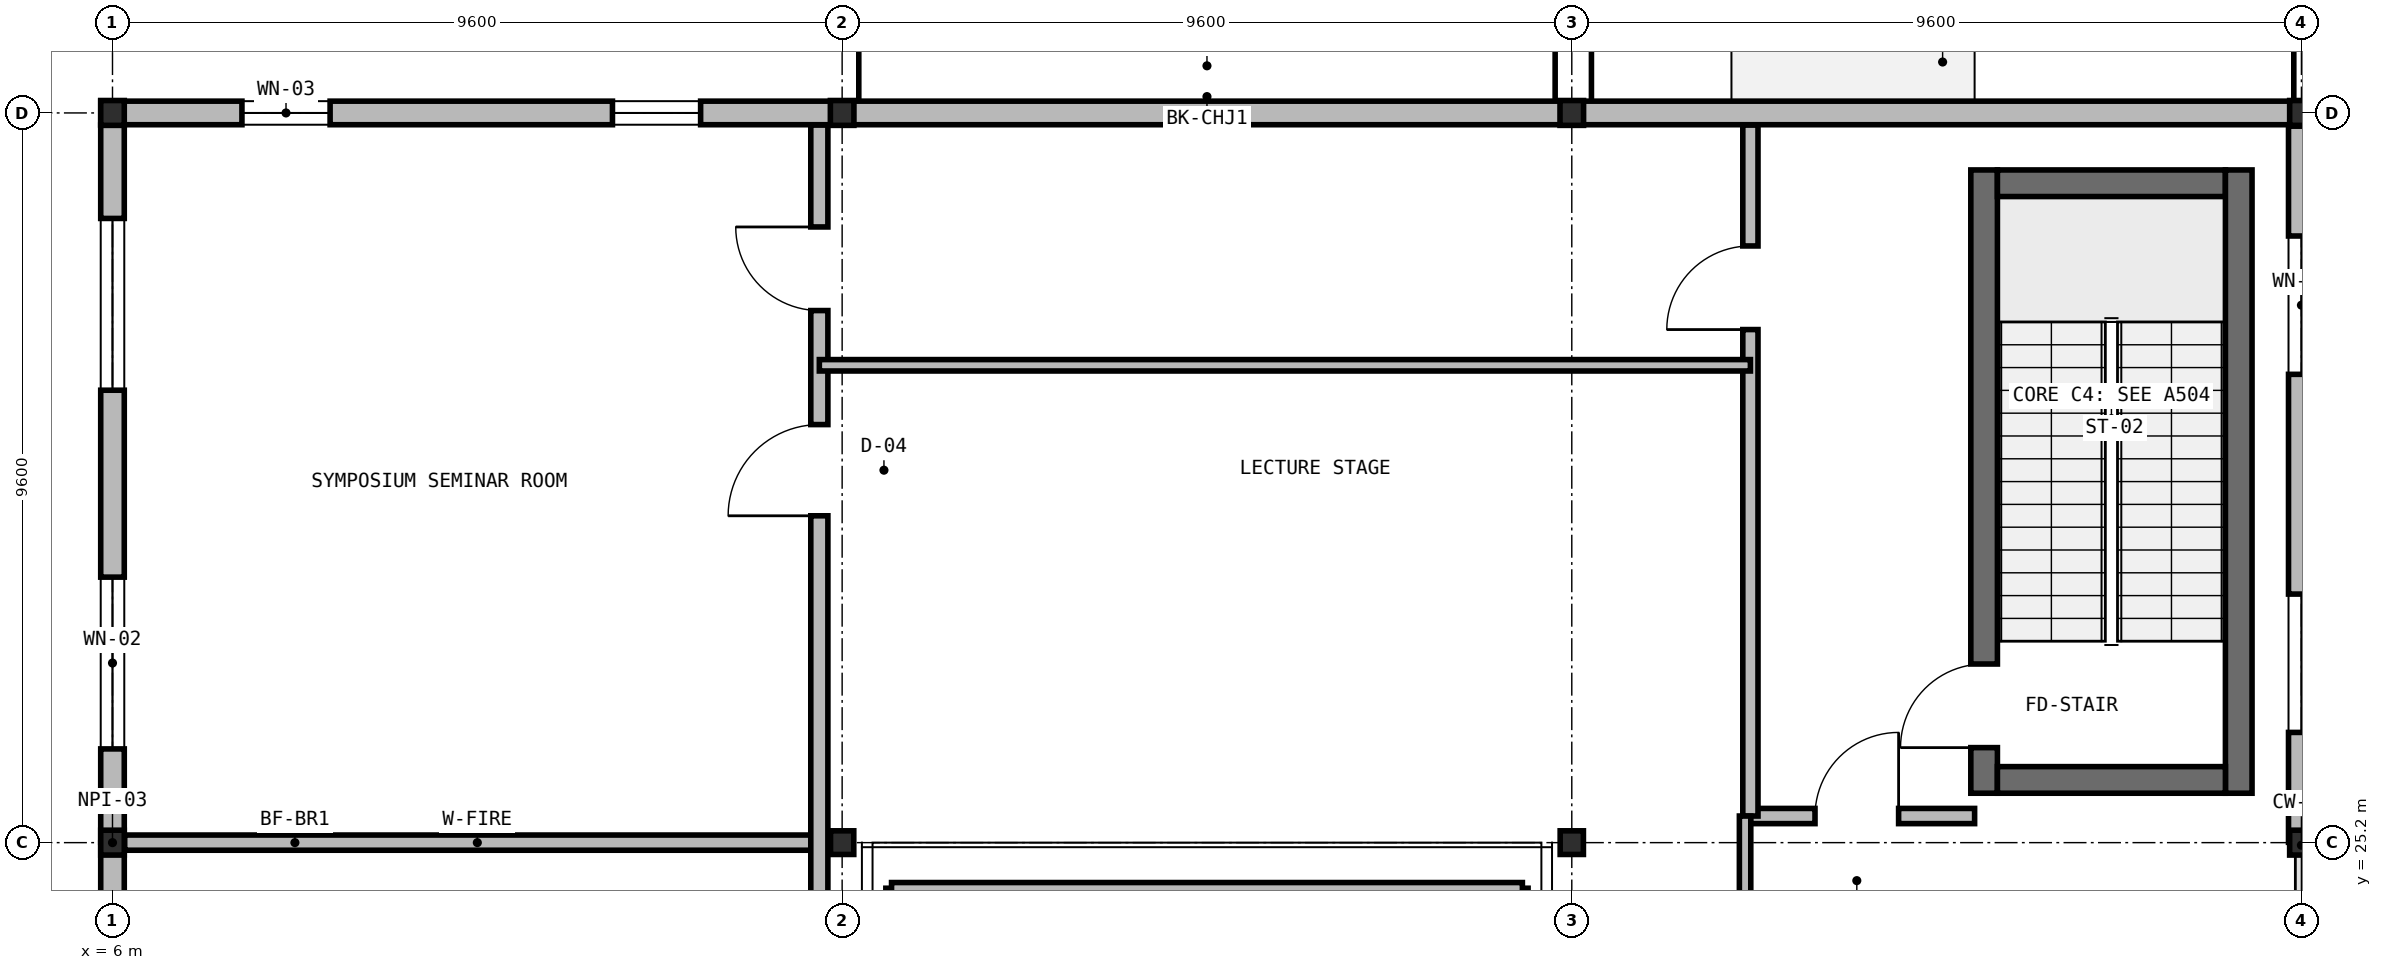
"""IFC4 building model, lengths in metres.
Left out: names, types, materials, properties, quantities, classifications, styles, units other than length and angle.
Written with IfcOpenShell. Run it as: python <this file> out.ifc"""

import sys

from ifc_helpers import new_model, si_unit, direction, frame, frame_2d, origin, origin_2d, place, context, subcontext, project, spatial, rectangle, i_section, extrude, element, fill, save


model = new_model("IFC4")
c1 = context("Model", 3, precision=1e-05, world=origin(), true_north=direction((0.0, 1.0)))
c2 = subcontext(c1, "Body", "Model", "MODEL_VIEW")
j1 = project(units=[si_unit("LENGTHUNIT", "METRE"), si_unit("PLANEANGLEUNIT", "RADIAN")], contexts=[c1])
p1 = place(None, origin())
s1 = spatial("IfcSite", under=j1, at=p1, CompositionType="ELEMENT")
p2 = place(p1, origin())
s2 = spatial("IfcBuilding", under=s1, at=p2, CompositionType="ELEMENT")
p3 = place(p2, origin())
s3 = spatial("IfcBuildingStorey", under=s2, at=p3, CompositionType="ELEMENT", Elevation=0.0)
p4 = place(p3, frame((30.625, 25.85, 0.0), z_axis=(0.0, 0.0, 1.0), x_axis=(0.0, 1.0, 0.0)))
e1 = element("IfcWall", 1, at=p4, inside=s3, PredefinedType="SHEAR", context=c2, shape_type="SweptSolid", body=[
    extrude(rectangle(XDim=8.2, YDim=0.35, at=frame_2d((4.1, 0.0))), origin(), (0.0, 0.0, 1.0), 5.25),
])
p5 = place(p4, frame((0.6, 0.0, 0.0)))
e2 = element("IfcOpeningElement", 2, at=p5, cuts=e1, PredefinedType="OPENING", context=c2, shape_type="SweptSolid", body=[
    extrude(rectangle(XDim=1.1, YDim=2.15, at=frame_2d((0.55, 1.075))), frame((0.0, 0.185, 0.0), z_axis=(0.0, -1.0, 0.0), x_axis=(1.0, 0.0, 0.0)), (0.0, 0.0, 1.0), 0.37),
])
p6 = place(p3, frame((30.8, 33.875, 0.0), z_axis=(0.0, 0.0, 1.0), x_axis=(1.0, 0.0, 0.0)))
e3 = element("IfcWall", 3, at=p6, inside=s3, PredefinedType="SHEAR", context=c2, shape_type="SweptSolid", body=[
    extrude(rectangle(XDim=3.0, YDim=0.35, at=frame_2d((1.5, 0.0))), origin(), (0.0, 0.0, 1.0), 5.25),
])
p7 = place(p3, frame((33.975, 34.05, 0.0), z_axis=(0.0, 0.0, 1.0), x_axis=(0.0, -1.0, 0.0)))
e4 = element("IfcWall", 4, at=p7, inside=s3, PredefinedType="SHEAR", context=c2, shape_type="SweptSolid", body=[
    extrude(rectangle(XDim=8.2, YDim=0.35, at=frame_2d((4.1, 0.0))), origin(), (0.0, 0.0, 1.0), 5.25),
])
p8 = place(p3, frame((33.8, 26.025, 0.0), z_axis=(0.0, 0.0, 1.0), x_axis=(-1.0, 0.0, 0.0)))
e5 = element("IfcWall", 5, at=p8, inside=s3, PredefinedType="SHEAR", context=c2, shape_type="SweptSolid", body=[
    extrude(rectangle(XDim=3.0, YDim=0.35, at=frame_2d((1.5, 0.0))), origin(), (0.0, 0.0, 1.0), 5.25),
])
for number, where, z_axis, x_axis in (
    (6, (6.0, 25.2, 0.0), (0.0, 0.0, 1.0), (1.0, 0.0, 0.0)),
    (7, (6.0, 34.8, 0.0), (0.0, 0.0, 1.0), (1.0, 0.0, 0.0)),
):
    element("IfcColumn", number, at=place(p3, frame(where, z_axis=z_axis, x_axis=x_axis)), inside=s3, PredefinedType="COLUMN", context=c2, shape_type="SweptSolid", body=[
        extrude(i_section(OverallWidth=0.31, OverallDepth=0.327, WebThickness=0.016, FlangeThickness=0.025, at=origin_2d()), origin(), (0.0, 0.0, 1.0), 5.25),
    ])
p9 = place(p3, frame((15.6, 25.2, 0.0), z_axis=(0.0, 0.0, 1.0), x_axis=(1.0, 0.0, 0.0)))
e8 = element("IfcColumn", 8, at=p9, inside=s3, PredefinedType="COLUMN", context=c2, shape_type="SweptSolid", body=[
    extrude(i_section(OverallWidth=0.306, OverallDepth=0.311, WebThickness=0.011, FlangeThickness=0.017, at=origin_2d()), origin(), (0.0, 0.0, 1.0), 5.25),
])
p10 = place(p3, frame((15.6, 34.8, 0.0), z_axis=(0.0, 0.0, 1.0), x_axis=(1.0, 0.0, 0.0)))
e9 = element("IfcColumn", 9, at=p10, inside=s3, PredefinedType="COLUMN", context=c2, shape_type="SweptSolid", body=[
    extrude(i_section(OverallWidth=0.31, OverallDepth=0.327, WebThickness=0.016, FlangeThickness=0.025, at=origin_2d()), origin(), (0.0, 0.0, 1.0), 5.25),
])
p11 = place(p3, frame((25.2, 25.2, 0.0), z_axis=(0.0, 0.0, 1.0), x_axis=(1.0, 0.0, 0.0)))
e10 = element("IfcColumn", 10, at=p11, inside=s3, PredefinedType="COLUMN", context=c2, shape_type="SweptSolid", body=[
    extrude(i_section(OverallWidth=0.306, OverallDepth=0.311, WebThickness=0.011, FlangeThickness=0.017, at=origin_2d()), origin(), (0.0, 0.0, 1.0), 5.25),
])
for number, where, z_axis, x_axis in (
    (11, (25.2, 34.8, 0.0), (0.0, 0.0, 1.0), (1.0, 0.0, 0.0)),
    (12, (34.8, 25.2, 0.0), (0.0, 0.0, 1.0), (1.0, 0.0, 0.0)),
    (13, (34.8, 34.8, 0.0), (0.0, 0.0, 1.0), (1.0, 0.0, 0.0)),
):
    element("IfcColumn", number, at=place(p3, frame(where, z_axis=z_axis, x_axis=x_axis)), inside=s3, PredefinedType="COLUMN", context=c2, shape_type="SweptSolid", body=[
        extrude(i_section(OverallWidth=0.31, OverallDepth=0.327, WebThickness=0.016, FlangeThickness=0.025, at=origin_2d()), origin(), (0.0, 0.0, 1.0), 5.25),
    ])
p12 = place(p3, frame((6.0, 15.604, 0.0), z_axis=(0.0, 0.0, 1.0), x_axis=(0.0, 1.0, 0.0)))
e14 = element("IfcWall", 14, at=p12, inside=s3, PredefinedType="SOLIDWALL", context=c2, shape_type="SweptSolid", body=[
    extrude(rectangle(XDim=9.592, YDim=0.31, at=frame_2d((4.796, 0.0))), origin(), (0.0, 0.0, 1.0), 4.584),
])
p13 = place(p12, frame((0.85, 0.0, 0.0)))
e15 = element("IfcOpeningElement", 15, at=p13, cuts=e14, PredefinedType="OPENING", context=c2, shape_type="SweptSolid", body=[
    extrude(rectangle(XDim=1.5, YDim=2.2, at=frame_2d((0.75, 1.1))), frame((0.0, 0.165, 0.0), z_axis=(0.0, -1.0, 0.0), x_axis=(1.0, 0.0, 0.0)), (0.0, 0.0, 1.0), 0.33),
])
p14 = place(p3, frame((6.0, 25.204, 0.0), z_axis=(0.0, 0.0, 1.0), x_axis=(0.0, 1.0, 0.0)))
e16 = element("IfcWall", 16, at=p14, inside=s3, PredefinedType="SOLIDWALL", context=c2, shape_type="SweptSolid", body=[
    extrude(rectangle(XDim=9.437, YDim=0.31, at=frame_2d((4.719, 0.0))), origin(), (0.0, 0.0, 1.0), 4.584),
])
p15 = place(p14, frame((1.229, 0.0, 0.95)))
e17 = element("IfcOpeningElement", 17, at=p15, cuts=e16, PredefinedType="OPENING", context=c2, shape_type="SweptSolid", body=[
    extrude(rectangle(XDim=2.26, YDim=1.86, at=frame_2d((1.13, 0.93))), frame((0.0, 0.165, 0.0), z_axis=(0.0, -1.0, 0.0), x_axis=(1.0, 0.0, 0.0)), (0.0, 0.0, 1.0), 0.33),
])
p16 = place(p14, frame((5.948, 0.0, 0.95)))
e18 = element("IfcOpeningElement", 18, at=p16, cuts=e16, PredefinedType="OPENING", context=c2, shape_type="SweptSolid", body=[
    extrude(rectangle(XDim=2.26, YDim=1.86, at=frame_2d((1.13, 0.93))), frame((0.0, 0.165, 0.0), z_axis=(0.0, -1.0, 0.0), x_axis=(1.0, 0.0, 0.0)), (0.0, 0.0, 1.0), 0.33),
])
p17 = place(p3, frame((5.845, 34.8, 0.0), z_axis=(0.0, 0.0, 1.0), x_axis=(1.0, 0.0, 0.0)))
e19 = element("IfcWall", 19, at=p17, inside=s3, PredefinedType="SOLIDWALL", context=c2, shape_type="SweptSolid", body=[
    extrude(rectangle(XDim=9.751, YDim=0.31, at=frame_2d((4.875, 0.0))), origin(), (0.0, 0.0, 1.0), 4.584),
])
p18 = place(p17, frame((1.858, 0.0, 0.95)))
e20 = element("IfcOpeningElement", 20, at=p18, cuts=e19, PredefinedType="OPENING", context=c2, shape_type="SweptSolid", body=[
    extrude(rectangle(XDim=1.16, YDim=1.7, at=frame_2d((0.58, 0.85))), frame((0.0, 0.165, 0.0), z_axis=(0.0, -1.0, 0.0), x_axis=(1.0, 0.0, 0.0)), (0.0, 0.0, 1.0), 0.33),
])
p19 = place(p17, frame((6.733, 0.0, 0.95)))
e21 = element("IfcOpeningElement", 21, at=p19, cuts=e19, PredefinedType="OPENING", context=c2, shape_type="SweptSolid", body=[
    extrude(rectangle(XDim=1.16, YDim=1.7, at=frame_2d((0.58, 0.85))), frame((0.0, 0.165, 0.0), z_axis=(0.0, -1.0, 0.0), x_axis=(1.0, 0.0, 0.0)), (0.0, 0.0, 1.0), 0.33),
])
p20 = place(p3, frame((15.604, 34.8, 0.0), z_axis=(0.0, 0.0, 1.0), x_axis=(1.0, 0.0, 0.0)))
e22 = element("IfcWall", 22, at=p20, inside=s3, PredefinedType="SOLIDWALL", context=c2, shape_type="SweptSolid", body=[
    extrude(rectangle(XDim=9.592, YDim=0.31, at=frame_2d((4.796, 0.0))), origin(), (0.0, 0.0, 1.0), 4.584),
])
p21 = place(p3, frame((25.204, 34.8, 0.0), z_axis=(0.0, 0.0, 1.0), x_axis=(1.0, 0.0, 0.0)))
e23 = element("IfcWall", 23, at=p21, inside=s3, PredefinedType="SOLIDWALL", context=c2, shape_type="SweptSolid", body=[
    extrude(rectangle(XDim=9.751, YDim=0.31, at=frame_2d((4.875, 0.0))), origin(), (0.0, 0.0, 1.0), 4.584),
])
p22 = place(p3, frame((34.8, 34.626, 0.0), z_axis=(0.0, 0.0, 1.0), x_axis=(0.0, -1.0, 0.0)))
e24 = element("IfcWall", 24, at=p22, inside=s3, PredefinedType="SOLIDWALL", context=c2, shape_type="SweptSolid", body=[
    extrude(rectangle(XDim=9.422, YDim=0.34, at=frame_2d((4.711, 0.0))), origin(), (0.0, 0.0, 1.0), 4.584),
])
p23 = place(p22, frame((1.445, 0.0, 0.95)))
e25 = element("IfcOpeningElement", 25, at=p23, cuts=e24, PredefinedType="OPENING", context=c2, shape_type="SweptSolid", body=[
    extrude(rectangle(XDim=1.82, YDim=2.02, at=frame_2d((0.91, 1.01))), frame((0.0, 0.18, 0.0), z_axis=(0.0, -1.0, 0.0), x_axis=(1.0, 0.0, 0.0)), (0.0, 0.0, 1.0), 0.36),
])
p24 = place(p22, frame((6.156, 0.0, 0.95)))
e26 = element("IfcOpeningElement", 26, at=p24, cuts=e24, PredefinedType="OPENING", context=c2, shape_type="SweptSolid", body=[
    extrude(rectangle(XDim=1.82, YDim=2.02, at=frame_2d((0.91, 1.01))), frame((0.0, 0.18, 0.0), z_axis=(0.0, -1.0, 0.0), x_axis=(1.0, 0.0, 0.0)), (0.0, 0.0, 1.0), 0.36),
])
p25 = place(p3, frame((6.16, 25.2, 0.0), z_axis=(0.0, 0.0, 1.0), x_axis=(1.0, 0.0, 0.0)))
e27 = element("IfcWall", 27, at=p25, inside=s3, PredefinedType="SOLIDWALL", context=c2, shape_type="SweptSolid", body=[
    extrude(rectangle(XDim=9.28, YDim=0.2, at=frame_2d((4.64, 0.0))), origin(), (0.0, 0.0, 1.0), 4.517),
])
p26 = place(p3, frame((27.55, 25.55, 0.0), z_axis=(0.0, 0.0, 1.0), x_axis=(1.0, 0.0, 0.0)))
e28 = element("IfcWall", 28, at=p26, inside=s3, PredefinedType="SOLIDWALL", context=c2, shape_type="SweptSolid", body=[
    extrude(rectangle(XDim=2.95, YDim=0.2, at=frame_2d((1.475, 0.0))), origin(), (0.0, 0.0, 1.0), 4.93),
])
p27 = place(p26, frame((0.85, 0.0, 0.0)))
e29 = element("IfcOpeningElement", 29, at=p27, cuts=e28, PredefinedType="OPENING", context=c2, shape_type="SweptSolid", body=[
    extrude(rectangle(XDim=1.1, YDim=2.15, at=frame_2d((0.55, 1.075))), frame((0.0, 0.11, 0.0), z_axis=(0.0, -1.0, 0.0), x_axis=(1.0, 0.0, 0.0)), (0.0, 0.0, 1.0), 0.22),
])
p28 = place(p3, frame((27.55, 25.55, 0.0), z_axis=(0.0, 0.0, 1.0), x_axis=(0.0, 1.0, 0.0)))
e30 = element("IfcWall", 30, at=p28, inside=s3, PredefinedType="SOLIDWALL", context=c2, shape_type="SweptSolid", body=[
    extrude(rectangle(XDim=9.09, YDim=0.2, at=frame_2d((4.545, 0.0))), origin(), (0.0, 0.0, 1.0), 4.93),
])
p29 = place(p28, frame((6.4, 0.0, 0.0)))
e31 = element("IfcOpeningElement", 31, at=p29, cuts=e30, PredefinedType="OPENING", context=c2, shape_type="SweptSolid", body=[
    extrude(rectangle(XDim=1.1, YDim=2.15, at=frame_2d((0.55, 1.075))), frame((0.0, 0.11, 0.0), z_axis=(0.0, -1.0, 0.0), x_axis=(1.0, 0.0, 0.0)), (0.0, 0.0, 1.0), 0.22),
])
for number, where, z_axis, x_axis in (
    (32, (16.25, 17.0, 0.0), (0.0, 0.0, 1.0), (0.0, 1.0, 0.0)),
    (33, (24.55, 17.0, 0.0), (0.0, 0.0, 1.0), (0.0, 1.0, 0.0)),
):
    element("IfcWall", number, at=place(p3, frame(where, z_axis=z_axis, x_axis=x_axis)), inside=s3, PredefinedType="PARTITIONING", context=c2, shape_type="SweptSolid", body=[
        extrude(rectangle(XDim=7.6, YDim=0.15, at=frame_2d((3.8, 0.0))), origin(), (0.0, 0.0, 1.0), 4.93),
    ])
p30 = place(p3, frame((16.25, 24.6, 0.0), z_axis=(0.0, 0.0, 1.0), x_axis=(1.0, 0.0, 0.0)))
e34 = element("IfcWall", 34, at=p30, inside=s3, PredefinedType="PARTITIONING", context=c2, shape_type="SweptSolid", body=[
    extrude(rectangle(XDim=8.3, YDim=0.15, at=frame_2d((4.15, 0.0))), origin(), (0.0, 0.0, 1.0), 4.93),
])
p31 = place(p3, frame((27.48, 13.9, 0.0), z_axis=(0.0, 0.0, 1.0), x_axis=(0.0, 1.0, 0.0)))
e35 = element("IfcWall", 35, at=p31, inside=s3, PredefinedType="PARTITIONING", context=c2, shape_type="SweptSolid", body=[
    extrude(rectangle(XDim=11.65, YDim=0.15, at=frame_2d((5.825, 0.0))), origin(), (0.0, 0.0, 1.0), 4.93),
])
p32 = place(p3, frame((15.3, 13.9, 0.0), z_axis=(0.0, 0.0, 1.0), x_axis=(0.0, 1.0, 0.0)))
e36 = element("IfcWall", 36, at=p32, inside=s3, PredefinedType="SOLIDWALL", context=c2, shape_type="SweptSolid", body=[
    extrude(rectangle(XDim=20.74, YDim=0.225, at=frame_2d((10.37, 0.0))), origin(), (0.0, 0.0, 1.0), 4.93),
])
p33 = place(p32, frame((3.3, 0.0, 0.0)))
e37 = element("IfcOpeningElement", 37, at=p33, cuts=e36, PredefinedType="OPENING", context=c2, shape_type="SweptSolid", body=[
    extrude(rectangle(XDim=1.2, YDim=2.2, at=frame_2d((0.6, 1.1))), frame((0.0, 0.123, 0.0), z_axis=(0.0, -1.0, 0.0), x_axis=(1.0, 0.0, 0.0)), (0.0, 0.0, 1.0), 0.245),
])
p34 = place(p32, frame((15.6, 0.0, 0.0)))
e38 = element("IfcOpeningElement", 38, at=p34, cuts=e36, PredefinedType="OPENING", context=c2, shape_type="SweptSolid", body=[
    extrude(rectangle(XDim=1.2, YDim=2.2, at=frame_2d((0.6, 1.1))), frame((0.0, 0.123, 0.0), z_axis=(0.0, -1.0, 0.0), x_axis=(1.0, 0.0, 0.0)), (0.0, 0.0, 1.0), 0.245),
])
p35 = place(p32, frame((18.3, 0.0, 0.0)))
e39 = element("IfcOpeningElement", 39, at=p35, cuts=e36, PredefinedType="OPENING", context=c2, shape_type="SweptSolid", body=[
    extrude(rectangle(XDim=1.1, YDim=2.2, at=frame_2d((0.55, 1.1))), frame((0.0, 0.123, 0.0), z_axis=(0.0, -1.0, 0.0), x_axis=(1.0, 0.0, 0.0)), (0.0, 0.0, 1.0), 0.245),
])
p36 = place(p3, frame((15.3, 31.48, 0.0), z_axis=(0.0, 0.0, 1.0), x_axis=(1.0, 0.0, 0.0)))
e40 = element("IfcWall", 40, at=p36, inside=s3, PredefinedType="PARTITIONING", context=c2, shape_type="SweptSolid", body=[
    extrude(rectangle(XDim=12.25, YDim=0.15, at=frame_2d((6.125, 0.0))), origin(), (0.0, 0.0, 1.0), 4.93),
])
p37 = place(p15, origin())
e41 = element("IfcWindow", 41, at=p37, inside=s3, PartitioningType="SINGLE_PANEL", PredefinedType="WINDOW", context=c2, shape_type="SweptSolid", body=[
    extrude(rectangle(XDim=2.26, YDim=1.86, at=frame_2d((1.13, 0.93))), frame((0.0, 0.03, 0.0), z_axis=(0.0, -1.0, 0.0), x_axis=(1.0, 0.0, 0.0)), (0.0, 0.0, 1.0), 0.06),
])
fill(e17, e41)
p38 = place(p16, origin())
e42 = element("IfcWindow", 42, at=p38, inside=s3, PartitioningType="SINGLE_PANEL", PredefinedType="WINDOW", context=c2, shape_type="SweptSolid", body=[
    extrude(rectangle(XDim=2.26, YDim=1.86, at=frame_2d((1.13, 0.93))), frame((0.0, 0.03, 0.0), z_axis=(0.0, -1.0, 0.0), x_axis=(1.0, 0.0, 0.0)), (0.0, 0.0, 1.0), 0.06),
])
fill(e18, e42)
p39 = place(p18, origin())
e43 = element("IfcWindow", 43, at=p39, inside=s3, PartitioningType="SINGLE_PANEL", PredefinedType="WINDOW", context=c2, shape_type="SweptSolid", body=[
    extrude(rectangle(XDim=1.16, YDim=1.7, at=frame_2d((0.58, 0.85))), frame((0.0, 0.03, 0.0), z_axis=(0.0, -1.0, 0.0), x_axis=(1.0, 0.0, 0.0)), (0.0, 0.0, 1.0), 0.06),
])
fill(e20, e43)
p40 = place(p19, origin())
e44 = element("IfcWindow", 44, at=p40, inside=s3, PartitioningType="SINGLE_PANEL", PredefinedType="WINDOW", context=c2, shape_type="SweptSolid", body=[
    extrude(rectangle(XDim=1.16, YDim=1.7, at=frame_2d((0.58, 0.85))), frame((0.0, 0.03, 0.0), z_axis=(0.0, -1.0, 0.0), x_axis=(1.0, 0.0, 0.0)), (0.0, 0.0, 1.0), 0.06),
])
fill(e21, e44)
p41 = place(p23, origin())
e45 = element("IfcWindow", 45, at=p41, inside=s3, PartitioningType="SINGLE_PANEL", PredefinedType="WINDOW", context=c2, shape_type="SweptSolid", body=[
    extrude(rectangle(XDim=1.82, YDim=2.02, at=frame_2d((0.91, 1.01))), frame((0.0, 0.03, 0.0), z_axis=(0.0, -1.0, 0.0), x_axis=(1.0, 0.0, 0.0)), (0.0, 0.0, 1.0), 0.06),
])
fill(e25, e45)
p42 = place(p24, origin())
e46 = element("IfcWindow", 46, at=p42, inside=s3, PartitioningType="SINGLE_PANEL", PredefinedType="WINDOW", context=c2, shape_type="SweptSolid", body=[
    extrude(rectangle(XDim=1.82, YDim=2.02, at=frame_2d((0.91, 1.01))), frame((0.0, 0.03, 0.0), z_axis=(0.0, -1.0, 0.0), x_axis=(1.0, 0.0, 0.0)), (0.0, 0.0, 1.0), 0.06),
])
fill(e26, e46)
p43 = place(p5, origin())
e47 = element("IfcDoor", 47, at=p43, inside=s3, OperationType="SINGLE_SWING_LEFT", PredefinedType="DOOR", context=c2, shape_type="SweptSolid", body=[
    extrude(rectangle(XDim=1.1, YDim=2.15, at=frame_2d((0.55, 1.075))), frame((0.0, 0.025, 0.0), z_axis=(0.0, -1.0, 0.0), x_axis=(1.0, 0.0, 0.0)), (0.0, 0.0, 1.0), 0.05),
])
fill(e2, e47)
p44 = place(p27, origin())
e48 = element("IfcDoor", 48, at=p44, inside=s3, OperationType="SINGLE_SWING_RIGHT", PredefinedType="DOOR", context=c2, shape_type="SweptSolid", body=[
    extrude(rectangle(XDim=1.1, YDim=2.15, at=frame_2d((0.55, 1.075))), frame((0.0, 0.025, 0.0), z_axis=(0.0, -1.0, 0.0), x_axis=(1.0, 0.0, 0.0)), (0.0, 0.0, 1.0), 0.05),
])
fill(e29, e48)
p45 = place(p29, origin())
e49 = element("IfcDoor", 49, at=p45, inside=s3, OperationType="SINGLE_SWING_LEFT", PredefinedType="DOOR", context=c2, shape_type="SweptSolid", body=[
    extrude(rectangle(XDim=1.1, YDim=2.15, at=frame_2d((0.55, 1.075))), frame((0.0, 0.025, 0.0), z_axis=(0.0, -1.0, 0.0), x_axis=(1.0, 0.0, 0.0)), (0.0, 0.0, 1.0), 0.05),
])
fill(e31, e49)
p46 = place(p34, origin())
e50 = element("IfcDoor", 50, at=p46, inside=s3, OperationType="SINGLE_SWING_LEFT", PredefinedType="DOOR", context=c2, shape_type="SweptSolid", body=[
    extrude(rectangle(XDim=1.2, YDim=2.2, at=frame_2d((0.6, 1.1))), frame((0.0, 0.025, 0.0), z_axis=(0.0, -1.0, 0.0), x_axis=(1.0, 0.0, 0.0)), (0.0, 0.0, 1.0), 0.05),
])
fill(e38, e50)
p47 = place(p35, origin())
e51 = element("IfcDoor", 51, at=p47, inside=s3, OperationType="SINGLE_SWING_RIGHT", PredefinedType="DOOR", context=c2, shape_type="SweptSolid", body=[
    extrude(rectangle(XDim=1.1, YDim=2.2, at=frame_2d((0.55, 1.1))), frame((0.0, 0.025, 0.0), z_axis=(0.0, -1.0, 0.0), x_axis=(1.0, 0.0, 0.0)), (0.0, 0.0, 1.0), 0.05),
])
fill(e39, e51)
save(model, sys.argv[1])
